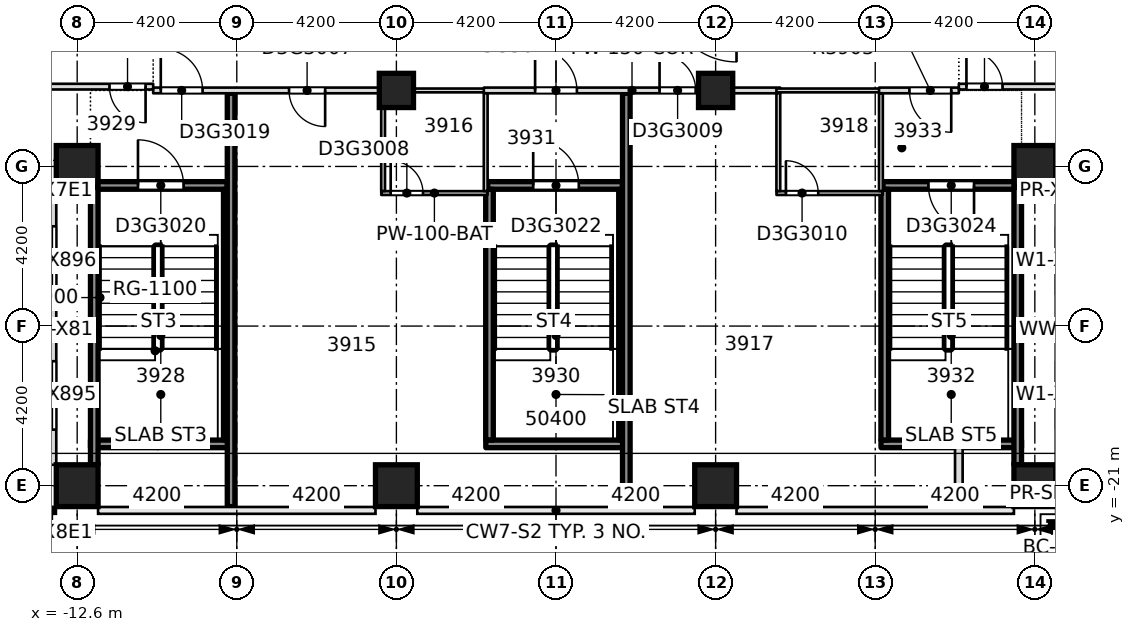
"""IFC4 building model, lengths in metres.
Left out: names, types, materials, properties, quantities, classifications, styles, units other than length and angle.
Written with IfcOpenShell. Run it as: python <this file> out.ifc"""

import sys

from ifc_helpers import new_model, si_unit, direction, frame, frame_2d, origin, origin_2d, place, context, subcontext, project, spatial, rectangle, extrude, element, fill, save


model = new_model("IFC4")
c1 = context("Model", 3, precision=1e-05, world=origin(), true_north=direction((0.0, 1.0)))
c2 = subcontext(c1, "Body", "Model", "MODEL_VIEW")
j1 = project(units=[si_unit("LENGTHUNIT", "METRE"), si_unit("PLANEANGLEUNIT", "RADIAN")], contexts=[c1])
p1 = place(None, origin())
s1 = spatial("IfcSite", under=j1, at=p1, CompositionType="ELEMENT")
p2 = place(p1, origin())
s2 = spatial("IfcBuilding", under=s1, at=p2, CompositionType="ELEMENT")
p3 = place(p2, frame((0.0, 0.0, 153.8)))
s3 = spatial("IfcBuildingStorey", under=s2, at=p3, CompositionType="ELEMENT", Elevation=153.8)
for number, where, z_axis, x_axis in (
    (1, (-12.6, -21.0, -0.4), (0.0, 0.0, 1.0), (1.0, 0.0, 0.0)),
    (2, (-4.2, -21.0, -0.4), (0.0, 0.0, 1.0), (1.0, 0.0, 0.0)),
    (3, (4.2, -21.0, -0.4), (0.0, 0.0, 1.0), (1.0, 0.0, 0.0)),
    (4, (12.6, -21.0, -0.4), (0.0, 0.0, 1.0), (1.0, 0.0, 0.0)),
    (5, (-12.6, -12.6, -0.4), (0.0, 0.0, 1.0), (1.0, 0.0, 0.0)),
    (6, (12.6, -12.6, -0.4), (0.0, 0.0, 1.0), (1.0, 0.0, 0.0)),
):
    element("IfcColumn", number, at=place(p3, frame(where, z_axis=z_axis, x_axis=x_axis)), inside=s3, PredefinedType="COLUMN", context=c2, shape_type="SweptSolid", body=[
        extrude(rectangle(XDim=1.1, YDim=1.1, at=origin_2d()), origin(), (0.0, 0.0, 1.0), 3.45),
    ])
for number, where, z_axis, x_axis in (
    (7, (-4.2, -10.6, -0.4), (0.0, 0.0, 1.0), (1.0, 0.0, 0.0)),
    (8, (4.2, -10.6, -0.4), (0.0, 0.0, 1.0), (1.0, 0.0, 0.0)),
):
    element("IfcColumn", number, at=place(p3, frame(where, z_axis=z_axis, x_axis=x_axis)), inside=s3, PredefinedType="COLUMN", context=c2, shape_type="SweptSolid", body=[
        extrude(rectangle(XDim=0.9, YDim=0.9, at=origin_2d()), origin(), (0.0, 0.0, 1.0), 3.45),
    ])
p4 = place(p3, frame((-10.478, -19.9, 0.0), z_axis=(0.0, 0.0, 1.0), x_axis=(1.0, 0.0, 0.0)))
e9 = element("IfcWall", 9, at=p4, inside=s3, PredefinedType="SOLIDWALL", context=c2, shape_type="SweptSolid", body=[
    extrude(rectangle(XDim=1.926, YDim=0.2, at=frame_2d((0.963, 0.0))), origin(), (0.0, 0.0, 1.0), 3.05),
])
p5 = place(p3, frame((-1.848, -19.9, 0.0), z_axis=(0.0, 0.0, 1.0), x_axis=(1.0, 0.0, 0.0)))
e10 = element("IfcWall", 10, at=p5, inside=s3, PredefinedType="SOLIDWALL", context=c2, shape_type="SweptSolid", body=[
    extrude(rectangle(XDim=3.696, YDim=0.2, at=frame_2d((1.848, 0.0))), origin(), (0.0, 0.0, 1.0), 3.05),
])
p6 = place(p3, frame((8.552, -19.9, 0.0), z_axis=(0.0, 0.0, 1.0), x_axis=(1.0, 0.0, 0.0)))
e11 = element("IfcWall", 11, at=p6, inside=s3, PredefinedType="SOLIDWALL", context=c2, shape_type="SweptSolid", body=[
    extrude(rectangle(XDim=2.026, YDim=0.2, at=frame_2d((1.013, 0.0))), origin(), (0.0, 0.0, 1.0), 3.05),
])
p7 = place(p3, frame((-4.598, -13.3, 0.0), z_axis=(0.0, 0.0, 1.0), x_axis=(1.0, 0.0, 0.0)))
e12 = element("IfcWall", 12, at=p7, inside=s3, PredefinedType="PARTITIONING", context=c2, shape_type="SweptSolid", body=[
    extrude(rectangle(XDim=2.796, YDim=0.1, at=frame_2d((1.398, 0.0))), origin(), (0.0, 0.0, 1.0), 3.05),
])
p8 = place(p7, frame((0.248, 0.0, 0.0)))
e13 = element("IfcOpeningElement", 13, at=p8, cuts=e12, PredefinedType="OPENING", context=c2, shape_type="SweptSolid", body=[
    extrude(rectangle(XDim=0.85, YDim=2.1, at=frame_2d((0.425, 1.05))), frame((0.0, 0.06, 0.0), z_axis=(0.0, -1.0, 0.0), x_axis=(1.0, 0.0, 0.0)), (0.0, 0.0, 1.0), 0.12),
])
p9 = place(p3, frame((5.802, -13.3, 0.0), z_axis=(0.0, 0.0, 1.0), x_axis=(1.0, 0.0, 0.0)))
e14 = element("IfcWall", 14, at=p9, inside=s3, PredefinedType="PARTITIONING", context=c2, shape_type="SweptSolid", body=[
    extrude(rectangle(XDim=2.796, YDim=0.1, at=frame_2d((1.398, 0.0))), origin(), (0.0, 0.0, 1.0), 3.05),
])
p10 = place(p9, frame((0.248, 0.0, 0.0)))
e15 = element("IfcOpeningElement", 15, at=p10, cuts=e14, PredefinedType="OPENING", context=c2, shape_type="SweptSolid", body=[
    extrude(rectangle(XDim=0.85, YDim=2.1, at=frame_2d((0.425, 1.05))), frame((0.0, 0.06, 0.0), z_axis=(0.0, -1.0, 0.0), x_axis=(1.0, 0.0, 0.0)), (0.0, 0.0, 1.0), 0.12),
])
p11 = place(p3, frame((-12.15, -13.1, 0.0), z_axis=(0.0, 0.0, 1.0), x_axis=(1.0, 0.0, 0.0)))
e16 = element("IfcWall", 16, at=p11, inside=s3, PredefinedType="SOLIDWALL", context=c2, shape_type="SweptSolid", body=[
    extrude(rectangle(XDim=3.498, YDim=0.2, at=frame_2d((1.749, 0.0))), origin(), (0.0, 0.0, 1.0), 3.05),
])
p12 = place(p11, frame((1.15, 0.0, 0.0)))
e17 = element("IfcOpeningElement", 17, at=p12, cuts=e16, PredefinedType="OPENING", context=c2, shape_type="SweptSolid", body=[
    extrude(rectangle(XDim=1.2, YDim=2.1, at=frame_2d((0.6, 1.05))), frame((0.0, 0.11, 0.0), z_axis=(0.0, -1.0, 0.0), x_axis=(1.0, 0.0, 0.0)), (0.0, 0.0, 1.0), 0.22),
])
p13 = place(p3, frame((-1.798, -13.1, 0.0), z_axis=(0.0, 0.0, 1.0), x_axis=(1.0, 0.0, 0.0)))
e18 = element("IfcWall", 18, at=p13, inside=s3, PredefinedType="SOLIDWALL", context=c2, shape_type="SweptSolid", body=[
    extrude(rectangle(XDim=3.546, YDim=0.2, at=frame_2d((1.773, 0.0))), origin(), (0.0, 0.0, 1.0), 3.05),
])
p14 = place(p13, frame((1.198, 0.0, 0.0)))
e19 = element("IfcOpeningElement", 19, at=p14, cuts=e18, PredefinedType="OPENING", context=c2, shape_type="SweptSolid", body=[
    extrude(rectangle(XDim=1.2, YDim=2.1, at=frame_2d((0.6, 1.05))), frame((0.0, 0.11, 0.0), z_axis=(0.0, -1.0, 0.0), x_axis=(1.0, 0.0, 0.0)), (0.0, 0.0, 1.0), 0.22),
])
p15 = place(p3, frame((8.602, -13.1, 0.0), z_axis=(0.0, 0.0, 1.0), x_axis=(1.0, 0.0, 0.0)))
e20 = element("IfcWall", 20, at=p15, inside=s3, PredefinedType="SOLIDWALL", context=c2, shape_type="SweptSolid", body=[
    extrude(rectangle(XDim=3.548, YDim=0.2, at=frame_2d((1.774, 0.0))), origin(), (0.0, 0.0, 1.0), 3.05),
])
p16 = place(p15, frame((1.198, 0.0, 0.0)))
e21 = element("IfcOpeningElement", 21, at=p16, cuts=e20, PredefinedType="OPENING", context=c2, shape_type="SweptSolid", body=[
    extrude(rectangle(XDim=1.2, YDim=2.1, at=frame_2d((0.6, 1.05))), frame((0.0, 0.11, 0.0), z_axis=(0.0, -1.0, 0.0), x_axis=(1.0, 0.0, 0.0)), (0.0, 0.0, 1.0), 0.22),
])
p17 = place(p3, frame((-10.6, -10.6, 0.0), z_axis=(0.0, 0.0, 1.0), x_axis=(1.0, 0.0, 0.0)))
e22 = element("IfcWall", 22, at=p17, inside=s3, PredefinedType="PARTITIONING", context=c2, shape_type="SweptSolid", body=[
    extrude(rectangle(XDim=6.1, YDim=0.15, at=frame_2d((3.05, 0.0))), origin(), (0.0, 0.0, 1.0), 3.05),
])
p18 = place(p17, frame((3.575, 0.0, 0.0)))
e23 = element("IfcOpeningElement", 23, at=p18, cuts=e22, PredefinedType="OPENING", context=c2, shape_type="SweptSolid", body=[
    extrude(rectangle(XDim=0.95, YDim=2.1, at=frame_2d((0.475, 1.05))), frame((0.0, 0.085, 0.0), z_axis=(0.0, -1.0, 0.0), x_axis=(1.0, 0.0, 0.0)), (0.0, 0.0, 1.0), 0.17),
])
p19 = place(p17, frame((0.2, 0.0, 0.0)))
e24 = element("IfcOpeningElement", 24, at=p19, cuts=e22, PredefinedType="OPENING", context=c2, shape_type="SweptSolid", body=[
    extrude(rectangle(XDim=1.1, YDim=2.1, at=frame_2d((0.55, 1.05))), frame((0.0, 0.085, 0.0), z_axis=(0.0, -1.0, 0.0), x_axis=(1.0, 0.0, 0.0)), (0.0, 0.0, 1.0), 0.17),
])
p20 = place(p3, frame((-4.6, -10.6, 0.0), z_axis=(0.0, 0.0, 1.0), x_axis=(1.0, 0.0, 0.0)))
e25 = element("IfcWall", 25, at=p20, inside=s3, PredefinedType="PARTITIONING", context=c2, shape_type="SweptSolid", body=[
    extrude(rectangle(XDim=2.8, YDim=0.1, at=frame_2d((1.4, 0.0))), origin(), (0.0, 0.0, 1.0), 3.05),
])
p21 = place(p3, frame((-1.9, -10.6, 0.0), z_axis=(0.0, 0.0, 1.0), x_axis=(1.0, 0.0, 0.0)))
e26 = element("IfcWall", 26, at=p21, inside=s3, PredefinedType="PARTITIONING", context=c2, shape_type="SweptSolid", body=[
    extrude(rectangle(XDim=7.8, YDim=0.15, at=frame_2d((3.9, 0.0))), origin(), (0.0, 0.0, 1.0), 3.05),
])
p22 = place(p21, frame((4.625, 0.0, 0.0)))
e27 = element("IfcOpeningElement", 27, at=p22, cuts=e26, PredefinedType="OPENING", context=c2, shape_type="SweptSolid", body=[
    extrude(rectangle(XDim=0.95, YDim=2.1, at=frame_2d((0.475, 1.05))), frame((0.0, 0.085, 0.0), z_axis=(0.0, -1.0, 0.0), x_axis=(1.0, 0.0, 0.0)), (0.0, 0.0, 1.0), 0.17),
])
p23 = place(p21, frame((1.35, 0.0, 0.0)))
e28 = element("IfcOpeningElement", 28, at=p23, cuts=e26, PredefinedType="OPENING", context=c2, shape_type="SweptSolid", body=[
    extrude(rectangle(XDim=1.1, YDim=2.1, at=frame_2d((0.55, 1.05))), frame((0.0, 0.085, 0.0), z_axis=(0.0, -1.0, 0.0), x_axis=(1.0, 0.0, 0.0)), (0.0, 0.0, 1.0), 0.17),
])
p24 = place(p3, frame((5.8, -10.6, 0.0), z_axis=(0.0, 0.0, 1.0), x_axis=(1.0, 0.0, 0.0)))
e29 = element("IfcWall", 29, at=p24, inside=s3, PredefinedType="PARTITIONING", context=c2, shape_type="SweptSolid", body=[
    extrude(rectangle(XDim=2.8, YDim=0.1, at=frame_2d((1.4, 0.0))), origin(), (0.0, 0.0, 1.0), 3.05),
])
p25 = place(p3, frame((8.5, -10.6, 0.0), z_axis=(0.0, 0.0, 1.0), x_axis=(1.0, 0.0, 0.0)))
e30 = element("IfcWall", 30, at=p25, inside=s3, PredefinedType="PARTITIONING", context=c2, shape_type="SweptSolid", body=[
    extrude(rectangle(XDim=2.1, YDim=0.15, at=frame_2d((1.05, 0.0))), origin(), (0.0, 0.0, 1.0), 3.05),
])
p26 = place(p25, frame((0.8, 0.0, 0.0)))
e31 = element("IfcOpeningElement", 31, at=p26, cuts=e30, PredefinedType="OPENING", context=c2, shape_type="SweptSolid", body=[
    extrude(rectangle(XDim=1.1, YDim=2.1, at=frame_2d((0.55, 1.05))), frame((0.0, 0.085, 0.0), z_axis=(0.0, -1.0, 0.0), x_axis=(1.0, 0.0, 0.0)), (0.0, 0.0, 1.0), 0.17),
])
p27 = place(p3, frame((-21.55, -10.5, 0.0), z_axis=(0.0, 0.0, 1.0), x_axis=(1.0, 0.0, 0.0)))
e32 = element("IfcWall", 32, at=p27, inside=s3, PredefinedType="PARTITIONING", context=c2, shape_type="SweptSolid", body=[
    extrude(rectangle(XDim=10.95, YDim=0.15, at=frame_2d((5.475, 0.0))), origin(), (0.0, 0.0, 1.0), 3.05),
])
p28 = place(p27, frame((9.8, 0.0, 0.0)))
e33 = element("IfcOpeningElement", 33, at=p28, cuts=e32, PredefinedType="OPENING", context=c2, shape_type="SweptSolid", body=[
    extrude(rectangle(XDim=0.95, YDim=2.1, at=frame_2d((0.475, 1.05))), frame((0.0, 0.085, 0.0), z_axis=(0.0, -1.0, 0.0), x_axis=(1.0, 0.0, 0.0)), (0.0, 0.0, 1.0), 0.17),
])
p29 = place(p3, frame((10.6, -10.5, 0.0), z_axis=(0.0, 0.0, 1.0), x_axis=(1.0, 0.0, 0.0)))
e34 = element("IfcWall", 34, at=p29, inside=s3, PredefinedType="PARTITIONING", context=c2, shape_type="SweptSolid", body=[
    extrude(rectangle(XDim=10.95, YDim=0.15, at=frame_2d((5.475, 0.0))), origin(), (0.0, 0.0, 1.0), 3.05),
])
p30 = place(p29, frame((0.2, 0.0, 0.0)))
e35 = element("IfcOpeningElement", 35, at=p30, cuts=e34, PredefinedType="OPENING", context=c2, shape_type="SweptSolid", body=[
    extrude(rectangle(XDim=0.95, YDim=2.1, at=frame_2d((0.475, 1.05))), frame((0.0, 0.085, 0.0), z_axis=(0.0, -1.0, 0.0), x_axis=(1.0, 0.0, 0.0)), (0.0, 0.0, 1.0), 0.17),
])
p31 = place(p3, frame((-8.65, -19.798, 0.0), z_axis=(0.0, 0.0, 1.0), x_axis=(0.0, 1.0, 0.0)))
e36 = element("IfcWall", 36, at=p31, inside=s3, PredefinedType="SOLIDWALL", context=c2, shape_type="SweptSolid", body=[
    extrude(rectangle(XDim=6.596, YDim=0.2, at=frame_2d((3.298, 0.0))), origin(), (0.0, 0.0, 1.0), 3.05),
])
for number, where, z_axis, x_axis in (
    (37, (-4.55, -13.248, 0.0), (0.0, 0.0, 1.0), (0.0, 1.0, 0.0)),
    (38, (-1.85, -13.248, 0.0), (0.0, 0.0, 1.0), (0.0, 1.0, 0.0)),
):
    element("IfcWall", number, at=place(p3, frame(where, z_axis=z_axis, x_axis=x_axis)), inside=s3, PredefinedType="PARTITIONING", context=c2, shape_type="SweptSolid", body=[
        extrude(rectangle(XDim=2.573, YDim=0.1, at=frame_2d((1.287, 0.0))), origin(), (0.0, 0.0, 1.0), 3.05),
    ])
for number, where, z_axis, x_axis in (
    (39, (-1.75, -19.798, 0.0), (0.0, 0.0, 1.0), (0.0, 1.0, 0.0)),
    (40, (1.75, -19.798, 0.0), (0.0, 0.0, 1.0), (0.0, 1.0, 0.0)),
):
    element("IfcWall", number, at=place(p3, frame(where, z_axis=z_axis, x_axis=x_axis)), inside=s3, PredefinedType="SOLIDWALL", context=c2, shape_type="SweptSolid", body=[
        extrude(rectangle(XDim=6.596, YDim=0.2, at=frame_2d((3.298, 0.0))), origin(), (0.0, 0.0, 1.0), 3.05),
    ])
for number, where, z_axis, x_axis in (
    (41, (5.85, -13.248, 0.0), (0.0, 0.0, 1.0), (0.0, 1.0, 0.0)),
    (42, (8.55, -13.248, 0.0), (0.0, 0.0, 1.0), (0.0, 1.0, 0.0)),
):
    element("IfcWall", number, at=place(p3, frame(where, z_axis=z_axis, x_axis=x_axis)), inside=s3, PredefinedType="PARTITIONING", context=c2, shape_type="SweptSolid", body=[
        extrude(rectangle(XDim=2.573, YDim=0.1, at=frame_2d((1.287, 0.0))), origin(), (0.0, 0.0, 1.0), 3.05),
    ])
p32 = place(p3, frame((8.65, -19.798, 0.0), z_axis=(0.0, 0.0, 1.0), x_axis=(0.0, 1.0, 0.0)))
e43 = element("IfcWall", 43, at=p32, inside=s3, PredefinedType="SOLIDWALL", context=c2, shape_type="SweptSolid", body=[
    extrude(rectangle(XDim=6.596, YDim=0.2, at=frame_2d((3.298, 0.0))), origin(), (0.0, 0.0, 1.0), 3.05),
])
p33 = place(p3, frame((10.6, -21.55, 0.0), z_axis=(0.0, 0.0, 1.0), x_axis=(0.0, 1.0, 0.0)))
e44 = element("IfcWall", 44, at=p33, inside=s3, PredefinedType="PARTITIONING", context=c2, shape_type="SweptSolid", body=[
    extrude(rectangle(XDim=1.548, YDim=0.2, at=frame_2d((0.774, 0.0))), origin(), (0.0, 0.0, 1.0), 3.05),
])
p34 = place(p3, frame((-13.25, -13.35, 0.0), z_axis=(0.0, 0.0, 1.0), x_axis=(0.0, -1.0, 0.0)))
e45 = element("IfcWall", 45, at=p34, inside=s3, PredefinedType="STANDARD", context=c2, shape_type="SweptSolid", body=[
    extrude(rectangle(XDim=7.1, YDim=0.2, at=frame_2d((3.55, 0.0))), origin(), (0.0, 0.0, 1.0), 3.05),
])
p35 = place(p34, frame((4.375, 0.0, 0.2)))
e46 = element("IfcOpeningElement", 46, at=p35, cuts=e45, PredefinedType="OPENING", context=c2, shape_type="SweptSolid", body=[
    extrude(rectangle(XDim=1.8, YDim=2.65, at=frame_2d((0.9, 1.325))), frame((0.0, 0.11, 0.0), z_axis=(0.0, -1.0, 0.0), x_axis=(1.0, 0.0, 0.0)), (0.0, 0.0, 1.0), 0.22),
])
p36 = place(p34, frame((0.825, 0.0, 0.2)))
e47 = element("IfcOpeningElement", 47, at=p36, cuts=e45, PredefinedType="OPENING", context=c2, shape_type="SweptSolid", body=[
    extrude(rectangle(XDim=1.8, YDim=2.65, at=frame_2d((0.9, 1.325))), frame((0.0, 0.11, 0.0), z_axis=(0.0, -1.0, 0.0), x_axis=(1.0, 0.0, 0.0)), (0.0, 0.0, 1.0), 0.22),
])
p37 = place(p3, frame((-12.25, -19.9, 0.0), z_axis=(0.0, 0.0, 1.0), x_axis=(1.0, 0.0, 0.0)))
e48 = element("IfcWall", 48, at=p37, inside=s3, PredefinedType="SOLIDWALL", context=c2, shape_type="SweptSolid", body=[
    extrude(rectangle(XDim=1.772, YDim=0.2, at=frame_2d((0.886, 0.0))), origin(), (0.0, 0.0, 1.0), 3.05),
])
p38 = place(p3, frame((10.578, -19.9, 0.0), z_axis=(0.0, 0.0, 1.0), x_axis=(1.0, 0.0, 0.0)))
e49 = element("IfcWall", 49, at=p38, inside=s3, PredefinedType="SOLIDWALL", context=c2, shape_type="SweptSolid", body=[
    extrude(rectangle(XDim=1.672, YDim=0.2, at=frame_2d((0.836, 0.0))), origin(), (0.0, 0.0, 1.0), 3.05),
])
p39 = place(p3, frame((-12.15, -20.45, 0.0), z_axis=(0.0, 0.0, 1.0), x_axis=(0.0, 1.0, 0.0)))
e50 = element("IfcWall", 50, at=p39, inside=s3, PredefinedType="SOLIDWALL", context=c2, shape_type="SweptSolid", body=[
    extrude(rectangle(XDim=7.3, YDim=0.2, at=frame_2d((3.65, 0.0))), origin(), (0.0, 0.0, 1.0), 3.05),
])
for number, where, z_axis, x_axis in (
    (51, (-8.55, -21.55, 0.0), (0.0, 0.0, 1.0), (0.0, 1.0, 0.0)),
    (52, (1.85, -21.55, 0.0), (0.0, 0.0, 1.0), (0.0, 1.0, 0.0)),
):
    element("IfcWall", number, at=place(p3, frame(where, z_axis=z_axis, x_axis=x_axis)), inside=s3, PredefinedType="SOLIDWALL", context=c2, shape_type="SweptSolid", body=[
        extrude(rectangle(XDim=10.875, YDim=0.2, at=frame_2d((5.438, 0.0))), origin(), (0.0, 0.0, 1.0), 3.05),
    ])
p40 = place(p3, frame((12.15, -20.45, 0.0), z_axis=(0.0, 0.0, 1.0), x_axis=(0.0, 1.0, 0.0)))
e53 = element("IfcWall", 53, at=p40, inside=s3, PredefinedType="SOLIDWALL", context=c2, shape_type="SweptSolid", body=[
    extrude(rectangle(XDim=7.3, YDim=0.2, at=frame_2d((3.65, 0.0))), origin(), (0.0, 0.0, 1.0), 3.05),
])
p41 = place(p28, origin())
e54 = element("IfcDoor", 54, at=p41, inside=s3, OperationType="SINGLE_SWING_RIGHT", PredefinedType="DOOR", context=c2, shape_type="SweptSolid", body=[
    extrude(rectangle(XDim=0.95, YDim=2.1, at=frame_2d((0.475, 1.05))), frame((0.0, 0.025, 0.0), z_axis=(0.0, -1.0, 0.0), x_axis=(1.0, 0.0, 0.0)), (0.0, 0.0, 1.0), 0.05),
])
fill(e33, e54)
p42 = place(p18, origin())
e55 = element("IfcDoor", 55, at=p42, inside=s3, OperationType="SINGLE_SWING_RIGHT", PredefinedType="DOOR", context=c2, shape_type="SweptSolid", body=[
    extrude(rectangle(XDim=0.95, YDim=2.1, at=frame_2d((0.475, 1.05))), frame((0.0, 0.025, 0.0), z_axis=(0.0, -1.0, 0.0), x_axis=(1.0, 0.0, 0.0)), (0.0, 0.0, 1.0), 0.05),
])
fill(e23, e55)
p43 = place(p8, origin())
e56 = element("IfcDoor", 56, at=p43, inside=s3, OperationType="SINGLE_SWING_LEFT", PredefinedType="DOOR", context=c2, shape_type="SweptSolid", body=[
    extrude(rectangle(XDim=0.85, YDim=2.1, at=frame_2d((0.425, 1.05))), frame((0.0, 0.025, 0.0), z_axis=(0.0, -1.0, 0.0), x_axis=(1.0, 0.0, 0.0)), (0.0, 0.0, 1.0), 0.05),
])
fill(e13, e56)
p44 = place(p22, origin())
e57 = element("IfcDoor", 57, at=p44, inside=s3, OperationType="SINGLE_SWING_RIGHT", PredefinedType="DOOR", context=c2, shape_type="SweptSolid", body=[
    extrude(rectangle(XDim=0.95, YDim=2.1, at=frame_2d((0.475, 1.05))), frame((0.0, 0.025, 0.0), z_axis=(0.0, -1.0, 0.0), x_axis=(1.0, 0.0, 0.0)), (0.0, 0.0, 1.0), 0.05),
])
fill(e27, e57)
p45 = place(p10, origin())
e58 = element("IfcDoor", 58, at=p45, inside=s3, OperationType="SINGLE_SWING_LEFT", PredefinedType="DOOR", context=c2, shape_type="SweptSolid", body=[
    extrude(rectangle(XDim=0.85, YDim=2.1, at=frame_2d((0.425, 1.05))), frame((0.0, 0.025, 0.0), z_axis=(0.0, -1.0, 0.0), x_axis=(1.0, 0.0, 0.0)), (0.0, 0.0, 1.0), 0.05),
])
fill(e15, e58)
p46 = place(p30, origin())
e59 = element("IfcDoor", 59, at=p46, inside=s3, OperationType="SINGLE_SWING_RIGHT", PredefinedType="DOOR", context=c2, shape_type="SweptSolid", body=[
    extrude(rectangle(XDim=0.95, YDim=2.1, at=frame_2d((0.475, 1.05))), frame((0.0, 0.025, 0.0), z_axis=(0.0, -1.0, 0.0), x_axis=(1.0, 0.0, 0.0)), (0.0, 0.0, 1.0), 0.05),
])
fill(e35, e59)
p47 = place(p19, origin())
e60 = element("IfcDoor", 60, at=p47, inside=s3, OperationType="SINGLE_SWING_RIGHT", PredefinedType="DOOR", context=c2, shape_type="SweptSolid", body=[
    extrude(rectangle(XDim=1.1, YDim=2.1, at=frame_2d((0.55, 1.05))), frame((0.0, 0.025, 0.0), z_axis=(0.0, -1.0, 0.0), x_axis=(1.0, 0.0, 0.0)), (0.0, 0.0, 1.0), 0.05),
])
fill(e24, e60)
p48 = place(p12, origin())
e61 = element("IfcDoor", 61, at=p48, inside=s3, OperationType="SINGLE_SWING_RIGHT", PredefinedType="DOOR", context=c2, shape_type="SweptSolid", body=[
    extrude(rectangle(XDim=1.2, YDim=2.1, at=frame_2d((0.6, 1.05))), frame((0.0, 0.025, 0.0), z_axis=(0.0, -1.0, 0.0), x_axis=(1.0, 0.0, 0.0)), (0.0, 0.0, 1.0), 0.05),
])
fill(e17, e61)
p49 = place(p23, origin())
e62 = element("IfcDoor", 62, at=p49, inside=s3, OperationType="SINGLE_SWING_RIGHT", PredefinedType="DOOR", context=c2, shape_type="SweptSolid", body=[
    extrude(rectangle(XDim=1.1, YDim=2.1, at=frame_2d((0.55, 1.05))), frame((0.0, 0.025, 0.0), z_axis=(0.0, -1.0, 0.0), x_axis=(1.0, 0.0, 0.0)), (0.0, 0.0, 1.0), 0.05),
])
fill(e28, e62)
p50 = place(p14, origin())
e63 = element("IfcDoor", 63, at=p50, inside=s3, OperationType="SINGLE_SWING_RIGHT", PredefinedType="DOOR", context=c2, shape_type="SweptSolid", body=[
    extrude(rectangle(XDim=1.2, YDim=2.1, at=frame_2d((0.6, 1.05))), frame((0.0, 0.025, 0.0), z_axis=(0.0, -1.0, 0.0), x_axis=(1.0, 0.0, 0.0)), (0.0, 0.0, 1.0), 0.05),
])
fill(e19, e63)
p51 = place(p26, origin())
e64 = element("IfcDoor", 64, at=p51, inside=s3, OperationType="SINGLE_SWING_RIGHT", PredefinedType="DOOR", context=c2, shape_type="SweptSolid", body=[
    extrude(rectangle(XDim=1.1, YDim=2.1, at=frame_2d((0.55, 1.05))), frame((0.0, 0.025, 0.0), z_axis=(0.0, -1.0, 0.0), x_axis=(1.0, 0.0, 0.0)), (0.0, 0.0, 1.0), 0.05),
])
fill(e31, e64)
p52 = place(p16, origin())
e65 = element("IfcDoor", 65, at=p52, inside=s3, OperationType="SINGLE_SWING_RIGHT", PredefinedType="DOOR", context=c2, shape_type="SweptSolid", body=[
    extrude(rectangle(XDim=1.2, YDim=2.1, at=frame_2d((0.6, 1.05))), frame((0.0, 0.025, 0.0), z_axis=(0.0, -1.0, 0.0), x_axis=(1.0, 0.0, 0.0)), (0.0, 0.0, 1.0), 0.05),
])
fill(e21, e65)
p53 = place(p35, origin())
e66 = element("IfcWindow", 66, at=p53, inside=s3, PartitioningType="SINGLE_PANEL", PredefinedType="WINDOW", context=c2, shape_type="SweptSolid", body=[
    extrude(rectangle(XDim=1.8, YDim=2.65, at=frame_2d((0.9, 1.325))), frame((0.0, 0.03, 0.0), z_axis=(0.0, -1.0, 0.0), x_axis=(1.0, 0.0, 0.0)), (0.0, 0.0, 1.0), 0.06),
])
fill(e46, e66)
p54 = place(p36, origin())
e67 = element("IfcWindow", 67, at=p54, inside=s3, PartitioningType="SINGLE_PANEL", PredefinedType="WINDOW", context=c2, shape_type="SweptSolid", body=[
    extrude(rectangle(XDim=1.8, YDim=2.65, at=frame_2d((0.9, 1.325))), frame((0.0, 0.03, 0.0), z_axis=(0.0, -1.0, 0.0), x_axis=(1.0, 0.0, 0.0)), (0.0, 0.0, 1.0), 0.06),
])
fill(e47, e67)
save(model, sys.argv[1])
